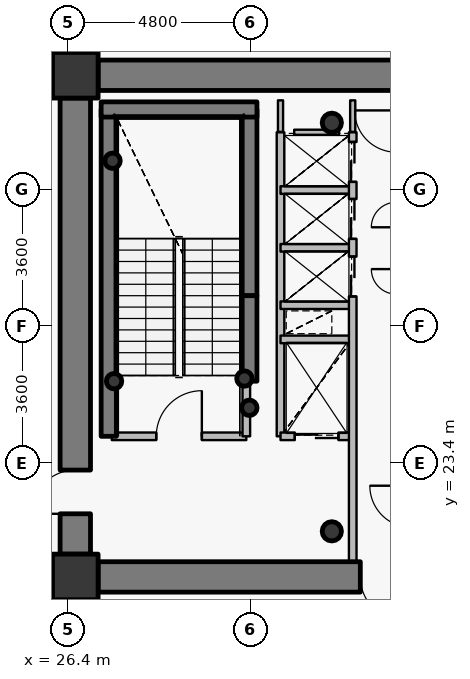
"""IFC4 building model, lengths in metres.
Left out: names, types, materials, properties, quantities, classifications, styles, units other than length and angle.
Written with IfcOpenShell. Run it as: python <this file> out.ifc"""

import sys

from ifc_helpers import new_model, si_unit, direction, frame, frame_2d, origin, origin_2d, place, context, subcontext, project, spatial, rectangle, hollow_circle, extrude, source, transform, mapped, element, fill, save


model = new_model("IFC4")
c1 = context("Model", 3, precision=1e-05, world=origin(), true_north=direction((0.0, 1.0)))
c2 = subcontext(c1, "Body", "Model", "MODEL_VIEW")
j1 = project(units=[si_unit("LENGTHUNIT", "METRE"), si_unit("PLANEANGLEUNIT", "RADIAN")], contexts=[c1])
p1 = place(None, origin())
s1 = spatial("IfcSite", under=j1, at=p1, CompositionType="ELEMENT")
p2 = place(p1, origin())
s2 = spatial("IfcBuilding", under=s1, at=p2, CompositionType="ELEMENT")
p3 = place(p2, frame((0.0, 0.0, 193.65)))
s3 = spatial("IfcBuildingStorey", under=s2, at=p3, CompositionType="ELEMENT", Elevation=193.65)
for number, where, z_axis, x_axis in (
    (1, (26.6, 20.4, 0.0), (0.0, 0.0, 1.0), (1.0, 0.0, 0.0)),
    (2, (26.6, 33.6, 0.0), (0.0, 0.0, 1.0), (1.0, 0.0, 0.0)),
):
    element("IfcColumn", number, at=place(p3, frame(where, z_axis=z_axis, x_axis=x_axis)), inside=s3, PredefinedType="COLUMN", context=c2, shape_type="SweptSolid", body=[
        extrude(rectangle(XDim=1.2, YDim=1.2, at=origin_2d()), origin(), (0.0, 0.0, 1.0), 3.75),
    ])
for number, where, z_axis, x_axis in (
    (3, (33.35, 21.6, 0.0), (0.0, 0.0, 1.0), (1.0, 0.0, 0.0)),
    (4, (33.35, 32.35, 0.0), (0.0, 0.0, 1.0), (1.0, 0.0, 0.0)),
):
    element("IfcColumn", number, at=place(p3, frame(where, z_axis=z_axis, x_axis=x_axis)), inside=s3, PredefinedType="COLUMN", context=c2, shape_type="SweptSolid", body=[
        extrude(hollow_circle(Radius=0.254, WallThickness=0.02, at=origin_2d()), origin(), (0.0, 0.0, 1.0), 3.75),
    ])
p4 = place(p3, frame((27.48, 24.1, 0.0), z_axis=(0.0, 0.0, 1.0), x_axis=(0.0, 1.0, 0.0)))
e5 = element("IfcWall", 5, at=p4, inside=s3, PredefinedType="SHEAR", context=c2, shape_type="SweptSolid", body=[
    extrude(rectangle(XDim=8.6, YDim=0.4, at=frame_2d((4.3, 0.0))), origin(), (0.0, 0.0, 1.0), 3.75),
])
p5 = place(p3, frame((31.18, 27.8, 0.0), z_axis=(0.0, 0.0, 1.0), x_axis=(0.0, 1.0, 0.0)))
e6 = element("IfcWall", 6, at=p5, inside=s3, PredefinedType="SHEAR", context=c2, shape_type="SweptSolid", body=[
    extrude(rectangle(XDim=4.9, YDim=0.4, at=frame_2d((2.45, 0.0))), origin(), (0.0, 0.0, 1.0), 3.75),
])
p6 = place(p3, frame((27.28, 32.7, 0.0), z_axis=(0.0, 0.0, 1.0), x_axis=(1.0, 0.0, 0.0)))
e7 = element("IfcWall", 7, at=p6, inside=s3, PredefinedType="SHEAR", context=c2, shape_type="SweptSolid", body=[
    extrude(rectangle(XDim=4.1, YDim=0.4, at=frame_2d((2.05, 0.0))), origin(), (0.0, 0.0, 1.0), 3.75),
])
for number, where, z_axis, x_axis in (
    (8, (27.58, 31.35, 0.0), (0.0, 0.0, 1.0), (1.0, 0.0, 0.0)),
    (9, (31.05, 25.62, 0.0), (0.0, 0.0, 1.0), (1.0, 0.0, 0.0)),
    (10, (31.18, 24.85, 0.0), (0.0, 0.0, 1.0), (1.0, 0.0, 0.0)),
    (11, (27.62, 25.55, 0.0), (0.0, 0.0, 1.0), (1.0, 0.0, 0.0)),
):
    element("IfcColumn", number, at=place(p3, frame(where, z_axis=z_axis, x_axis=x_axis)), inside=s3, PredefinedType="COLUMN", context=c2, shape_type="SweptSolid", body=[
        extrude(hollow_circle(Radius=0.203, WallThickness=0.016, at=origin_2d()), origin(), (0.0, 0.0, 1.0), 3.75),
    ])
p7 = place(p3, frame((27.2, 33.6, 0.0), z_axis=(0.0, 0.0, 1.0), x_axis=(1.0, 0.0, 0.0)))
e12 = element("IfcWall", 12, at=p7, inside=s3, PredefinedType="SHEAR", context=c2, shape_type="SweptSolid", body=[
    extrude(rectangle(XDim=17.6, YDim=0.8, at=frame_2d((8.8, 0.0))), origin(), (0.0, 0.0, 1.0), 2.95),
])
p8 = place(p7, frame((13.45, 0.0, 0.0)))
e13 = element("IfcOpeningElement", 13, at=p8, cuts=e12, PredefinedType="OPENING", context=c2, shape_type="SweptSolid", body=[
    extrude(rectangle(XDim=1.15, YDim=2.15, at=origin_2d()), frame((0.575, 0.41, 1.075), z_axis=(0.0, -1.0, 0.0), x_axis=(1.0, 0.0, 0.0)), (0.0, 0.0, 1.0), 0.82),
])
p9 = place(p3, frame((44.8, 20.4, 0.0), z_axis=(0.0, 0.0, 1.0), x_axis=(-1.0, 0.0, 0.0)))
e14 = element("IfcWall", 14, at=p9, inside=s3, PredefinedType="SHEAR", context=c2, shape_type="SweptSolid", body=[
    extrude(rectangle(XDim=17.6, YDim=0.8, at=frame_2d((8.8, 0.0))), origin(), (0.0, 0.0, 1.0), 2.95),
])
p10 = place(p9, frame((9.55, 0.0, 0.0)))
e15 = element("IfcOpeningElement", 15, at=p10, cuts=e14, PredefinedType="OPENING", context=c2, shape_type="SweptSolid", body=[
    extrude(rectangle(XDim=1.15, YDim=2.15, at=origin_2d()), frame((0.575, 0.41, 1.075), z_axis=(0.0, -1.0, 0.0), x_axis=(1.0, 0.0, 0.0)), (0.0, 0.0, 1.0), 0.82),
])
p11 = place(p3, frame((26.6, 21.0, 0.0), z_axis=(0.0, 0.0, 1.0), x_axis=(0.0, 1.0, 0.0)))
e16 = element("IfcWall", 16, at=p11, inside=s3, PredefinedType="SHEAR", context=c2, shape_type="SweptSolid", body=[
    extrude(rectangle(XDim=12.0, YDim=0.8, at=frame_2d((6.0, 0.0))), origin(), (0.0, 0.0, 1.0), 2.95),
])
p12 = place(p11, frame((1.061, 0.0, 0.0)))
e17 = element("IfcOpeningElement", 17, at=p12, cuts=e16, PredefinedType="OPENING", context=c2, shape_type="SweptSolid", body=[
    extrude(rectangle(XDim=1.15, YDim=2.15, at=origin_2d()), frame((0.575, 0.41, 1.075), z_axis=(0.0, -1.0, 0.0), x_axis=(1.0, 0.0, 0.0)), (0.0, 0.0, 1.0), 0.82),
])
p13 = place(p3, frame((31.18, 25.55, 0.0), z_axis=(0.0, 0.0, 1.0), x_axis=(0.0, 1.0, 0.0)))
e18 = element("IfcWall", 18, at=p13, inside=s3, PredefinedType="SHEAR", context=c2, shape_type="SweptSolid", body=[
    extrude(rectangle(XDim=2.25, YDim=0.4, at=frame_2d((1.125, 0.0))), origin(), (0.0, 0.0, 1.0), 3.1),
])
p14 = place(p3, frame((27.56, 24.1, 0.0), z_axis=(0.0, 0.0, 1.0), x_axis=(1.0, 0.0, 0.0)))
e19 = element("IfcWall", 19, at=p14, inside=s3, PredefinedType="PARTITIONING", context=c2, shape_type="SweptSolid", body=[
    extrude(rectangle(XDim=3.54, YDim=0.2, at=frame_2d((1.77, 0.0))), origin(), (0.0, 0.0, 1.0), 3.5),
])
p15 = place(p14, frame((1.17, 0.0, 0.0)))
e20 = element("IfcOpeningElement", 20, at=p15, cuts=e19, PredefinedType="OPENING", context=c2, shape_type="SweptSolid", body=[
    extrude(rectangle(XDim=1.2, YDim=2.15, at=origin_2d()), frame((0.6, 0.11, 1.075), z_axis=(0.0, -1.0, 0.0), x_axis=(1.0, 0.0, 0.0)), (0.0, 0.0, 1.0), 0.22),
])
p16 = place(p3, frame((31.1, 24.1, 0.0), z_axis=(0.0, 0.0, 1.0), x_axis=(0.0, 1.0, 0.0)))
e21 = element("IfcWall", 21, at=p16, inside=s3, PredefinedType="PARTITIONING", context=c2, shape_type="SweptSolid", body=[
    extrude(rectangle(XDim=1.44, YDim=0.2, at=frame_2d((0.72, 0.0))), origin(), (0.0, 0.0, 1.0), 3.5),
])
p17 = place(p3, frame((32.0, 24.1, 0.0), z_axis=(0.0, 0.0, 1.0), x_axis=(0.0, 1.0, 0.0)))
e22 = element("IfcWall", 22, at=p17, inside=s3, PredefinedType="PARTITIONING", context=c2, shape_type="SweptSolid", body=[
    extrude(rectangle(XDim=8.0, YDim=0.2, at=frame_2d((4.0, 0.0))), origin(), (0.0, 0.0, 1.0), 3.5),
])
p18 = place(p3, frame((32.0, 24.1, 0.0), z_axis=(0.0, 0.0, 1.0), x_axis=(1.0, 0.0, 0.0)))
e23 = element("IfcWall", 23, at=p18, inside=s3, PredefinedType="PARTITIONING", context=c2, shape_type="SweptSolid", body=[
    extrude(rectangle(XDim=1.9, YDim=0.2, at=frame_2d((0.95, 0.0))), origin(), (0.0, 0.0, 1.0), 3.085),
])
p19 = place(p18, frame((0.375, 0.0, 0.0)))
e24 = element("IfcOpeningElement", 24, at=p19, cuts=e23, PredefinedType="OPENING", context=c2, shape_type="SweptSolid", body=[
    extrude(rectangle(XDim=1.15, YDim=2.15, at=origin_2d()), frame((0.575, 0.11, 1.075), z_axis=(0.0, -1.0, 0.0), x_axis=(1.0, 0.0, 0.0)), (0.0, 0.0, 1.0), 0.22),
])
for number, where, z_axis, x_axis in (
    (25, (32.0, 26.65, 0.0), (0.0, 0.0, 1.0), (1.0, 0.0, 0.0)),
    (26, (32.0, 27.55, 0.0), (0.0, 0.0, 1.0), (1.0, 0.0, 0.0)),
    (27, (32.0, 29.06, 0.0), (0.0, 0.0, 1.0), (1.0, 0.0, 0.0)),
    (28, (32.0, 30.58, 0.0), (0.0, 0.0, 1.0), (1.0, 0.0, 0.0)),
):
    element("IfcWall", number, at=place(p3, frame(where, z_axis=z_axis, x_axis=x_axis)), inside=s3, PredefinedType="PARTITIONING", context=c2, shape_type="SweptSolid", body=[
        extrude(rectangle(XDim=1.9, YDim=0.2, at=frame_2d((0.95, 0.0))), origin(), (0.0, 0.0, 1.0), 3.085),
    ])
p20 = place(p3, frame((33.9, 20.8, 0.0), z_axis=(0.0, 0.0, 1.0), x_axis=(0.0, 1.0, 0.0)))
e29 = element("IfcWall", 29, at=p20, inside=s3, PredefinedType="PARTITIONING", context=c2, shape_type="SweptSolid", body=[
    extrude(rectangle(XDim=11.3, YDim=0.2, at=frame_2d((5.65, 0.0))), origin(), (0.0, 0.0, 1.0), 3.085),
])
p21 = place(p20, frame((6.98, 0.0, 0.0)))
e30 = element("IfcOpeningElement", 30, at=p21, cuts=e29, PredefinedType="OPENING", context=c2, shape_type="SweptSolid", body=[
    extrude(rectangle(XDim=1.05, YDim=2.15, at=origin_2d()), frame((0.525, 0.11, 1.075), z_axis=(0.0, -1.0, 0.0), x_axis=(1.0, 0.0, 0.0)), (0.0, 0.0, 1.0), 0.22),
])
p22 = place(p20, frame((8.495, 0.0, 0.0)))
e31 = element("IfcOpeningElement", 31, at=p22, cuts=e29, PredefinedType="OPENING", context=c2, shape_type="SweptSolid", body=[
    extrude(rectangle(XDim=1.05, YDim=2.15, at=origin_2d()), frame((0.525, 0.11, 1.075), z_axis=(0.0, -1.0, 0.0), x_axis=(1.0, 0.0, 0.0)), (0.0, 0.0, 1.0), 0.22),
])
p23 = place(p20, frame((9.995, 0.0, 0.0)))
e32 = element("IfcOpeningElement", 32, at=p23, cuts=e29, PredefinedType="OPENING", context=c2, shape_type="SweptSolid", body=[
    extrude(rectangle(XDim=1.05, YDim=2.15, at=origin_2d()), frame((0.525, 0.11, 1.075), z_axis=(0.0, -1.0, 0.0), x_axis=(1.0, 0.0, 0.0)), (0.0, 0.0, 1.0), 0.22),
])
p24 = place(p3, frame((32.36, 32.1, 0.0), z_axis=(0.0, 0.0, 1.0), x_axis=(1.0, 0.0, 0.0)))
e33 = element("IfcWall", 33, at=p24, inside=s3, PredefinedType="PARTITIONING", context=c2, shape_type="SweptSolid", body=[
    extrude(rectangle(XDim=1.18, YDim=0.135, at=frame_2d((0.59, 0.0))), origin(), (0.0, 0.0, 1.0), 3.085),
])
p25 = place(p3, frame((32.0, 32.94, 0.0), z_axis=(0.0, 0.0, 1.0), x_axis=(0.0, -1.0, 0.0)))
e34 = element("IfcWall", 34, at=p25, inside=s3, PredefinedType="PARTITIONING", context=c2, shape_type="SweptSolid", body=[
    extrude(rectangle(XDim=0.83, YDim=0.135, at=frame_2d((0.415, 0.0))), origin(), (0.0, 0.0, 1.0), 3.035),
])
p26 = place(p3, frame((33.9, 32.11, 0.0), z_axis=(0.0, 0.0, 1.0), x_axis=(0.0, 1.0, 0.0)))
e35 = element("IfcWall", 35, at=p26, inside=s3, PredefinedType="PARTITIONING", context=c2, shape_type="SweptSolid", body=[
    extrude(rectangle(XDim=0.83, YDim=0.135, at=frame_2d((0.415, 0.0))), origin(), (0.0, 0.0, 1.0), 3.085),
])
p27 = place(p3, frame((27.19, 34.0, 0.0), z_axis=(0.0, 0.0, 1.0), x_axis=(-1.0, 0.0, 0.0)))
e36 = element("IfcWall", 36, at=p27, inside=s3, PredefinedType="PARTITIONING", context=c2, shape_type="SweptSolid", body=[
    extrude(rectangle(XDim=0.99, YDim=0.135, at=frame_2d((0.495, 0.0))), origin(), (0.0, 0.0, 1.0), 2.935),
])
p28 = place(p3, frame((26.2, 33.692, 0.0), z_axis=(0.0, 0.0, 1.0), x_axis=(0.0, -1.0, 0.0)))
e37 = element("IfcWall", 37, at=p28, inside=s3, PredefinedType="PARTITIONING", context=c2, shape_type="SweptSolid", body=[
    extrude(rectangle(XDim=0.682, YDim=0.135, at=frame_2d((0.341, 0.0))), origin(), (0.0, 0.0, 1.0), 3.5),
])
p29 = place(p3, frame((26.2, 20.99, 0.0), z_axis=(0.0, 0.0, 1.0), x_axis=(0.0, -1.0, 0.0)))
e38 = element("IfcWall", 38, at=p29, inside=s3, PredefinedType="PARTITIONING", context=c2, shape_type="SweptSolid", body=[
    extrude(rectangle(XDim=0.99, YDim=0.135, at=frame_2d((0.495, 0.0))), origin(), (0.0, 0.0, 1.0), 3.5),
])
p30 = place(p3, frame((26.508, 20.0, 0.0), z_axis=(0.0, 0.0, 1.0), x_axis=(1.0, 0.0, 0.0)))
e39 = element("IfcWall", 39, at=p30, inside=s3, PredefinedType="PARTITIONING", context=c2, shape_type="SweptSolid", body=[
    extrude(rectangle(XDim=0.682, YDim=0.135, at=frame_2d((0.341, 0.0))), origin(), (0.0, 0.0, 1.0), 2.935),
])
m1 = source(origin(), c2, "Body", "SweptSolid", [
    extrude(rectangle(XDim=1.15, YDim=2.15, at=origin_2d()), frame((0.575, 0.025, 1.075), z_axis=(0.0, -1.0, 0.0), x_axis=(1.0, 0.0, 0.0)), (0.0, 0.0, 1.0), 0.05),
])
p31 = place(p12, origin())
e40 = element("IfcDoor", 40, at=p31, inside=s3, OperationType="SINGLE_SWING_LEFT", PredefinedType="DOOR", context=c2, shape_type="MappedRepresentation", body=[
    mapped(m1, transform((0.0, 0.0, 0.0), x_axis=(1.0, 0.0, 0.0), y_axis=(0.0, 1.0, 0.0), z_axis=(0.0, 0.0, 1.0), scale=1.0)),
])
fill(e17, e40)
p32 = place(p10, origin())
e41 = element("IfcDoor", 41, at=p32, inside=s3, OperationType="SINGLE_SWING_LEFT", PredefinedType="DOOR", context=c2, shape_type="MappedRepresentation", body=[
    mapped(m1, transform((0.0, 0.0, 0.0), x_axis=(1.0, 0.0, 0.0), y_axis=(0.0, 1.0, 0.0), z_axis=(0.0, 0.0, 1.0), scale=1.0)),
])
fill(e15, e41)
m2 = source(origin(), c2, "Body", "SweptSolid", [
    extrude(rectangle(XDim=1.2, YDim=2.15, at=origin_2d()), frame((0.6, 0.025, 1.075), z_axis=(0.0, -1.0, 0.0), x_axis=(1.0, 0.0, 0.0)), (0.0, 0.0, 1.0), 0.05),
])
p33 = place(p15, origin())
e42 = element("IfcDoor", 42, at=p33, inside=s3, OperationType="SINGLE_SWING_RIGHT", PredefinedType="DOOR", context=c2, shape_type="MappedRepresentation", body=[
    mapped(m2, transform((0.0, 0.0, 0.0), x_axis=(1.0, 0.0, 0.0), y_axis=(0.0, 1.0, 0.0), z_axis=(0.0, 0.0, 1.0), scale=1.0)),
])
fill(e20, e42)
m3 = source(origin(), c2, "Body", "SweptSolid", [
    extrude(rectangle(XDim=1.15, YDim=2.15, at=origin_2d()), frame((0.575, 0.025, 1.075), z_axis=(0.0, -1.0, 0.0), x_axis=(1.0, 0.0, 0.0)), (0.0, 0.0, 1.0), 0.05),
])
p34 = place(p19, origin())
e43 = element("IfcDoor", 43, at=p34, inside=s3, OperationType="DOUBLE_DOOR_SLIDING", PredefinedType="USERDEFINED", context=c2, shape_type="MappedRepresentation", body=[
    mapped(m3, transform((0.0, 0.0, 0.0), x_axis=(1.0, 0.0, 0.0), y_axis=(0.0, 1.0, 0.0), z_axis=(0.0, 0.0, 1.0), scale=1.0)),
])
fill(e24, e43)
m4 = source(origin(), c2, "Body", "SweptSolid", [
    extrude(rectangle(XDim=1.05, YDim=2.15, at=origin_2d()), frame((0.525, 0.025, 1.075), z_axis=(0.0, -1.0, 0.0), x_axis=(1.0, 0.0, 0.0)), (0.0, 0.0, 1.0), 0.05),
])
p35 = place(p21, origin())
e44 = element("IfcDoor", 44, at=p35, inside=s3, OperationType="DOUBLE_DOOR_SLIDING", PredefinedType="USERDEFINED", context=c2, shape_type="MappedRepresentation", body=[
    mapped(m4, transform((0.0, 0.0, 0.0), x_axis=(1.0, 0.0, 0.0), y_axis=(0.0, 1.0, 0.0), z_axis=(0.0, 0.0, 1.0), scale=1.0)),
])
fill(e30, e44)
p36 = place(p22, origin())
e45 = element("IfcDoor", 45, at=p36, inside=s3, OperationType="DOUBLE_DOOR_SLIDING", PredefinedType="USERDEFINED", context=c2, shape_type="MappedRepresentation", body=[
    mapped(m4, transform((0.0, 0.0, 0.0), x_axis=(1.0, 0.0, 0.0), y_axis=(0.0, 1.0, 0.0), z_axis=(0.0, 0.0, 1.0), scale=1.0)),
])
fill(e31, e45)
p37 = place(p23, origin())
e46 = element("IfcDoor", 46, at=p37, inside=s3, OperationType="DOUBLE_DOOR_SLIDING", PredefinedType="USERDEFINED", context=c2, shape_type="MappedRepresentation", body=[
    mapped(m4, transform((0.0, 0.0, 0.0), x_axis=(1.0, 0.0, 0.0), y_axis=(0.0, 1.0, 0.0), z_axis=(0.0, 0.0, 1.0), scale=1.0)),
])
fill(e32, e46)
save(model, sys.argv[1])
